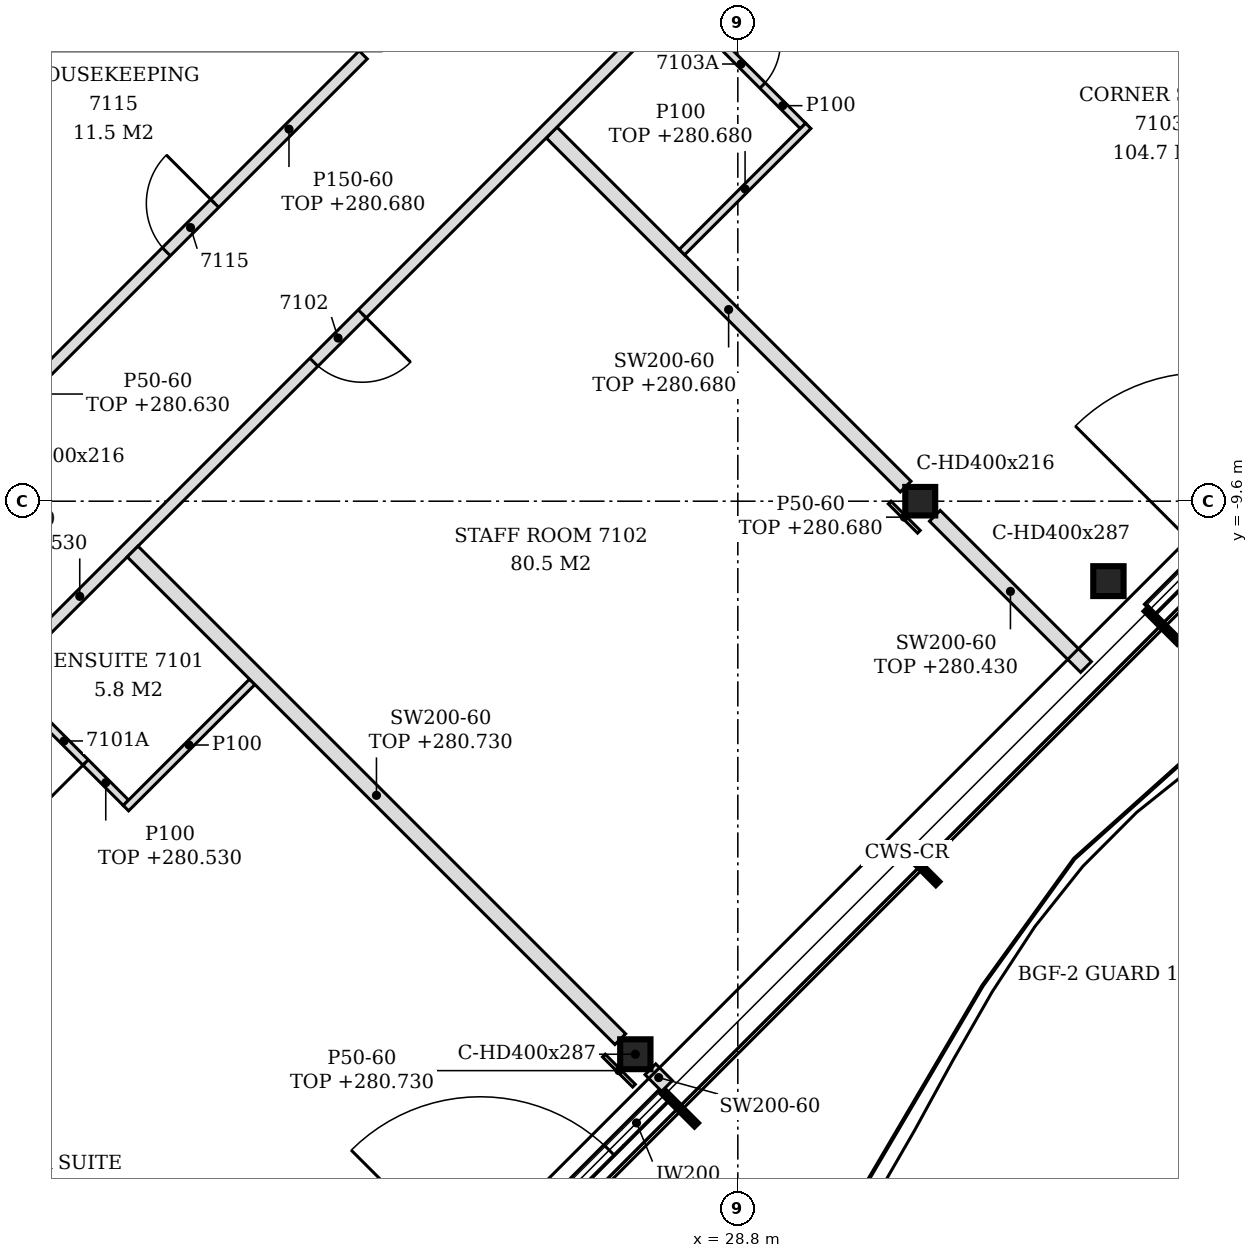
"""IFC4 building model, lengths in metres.
Left out: names, types, materials, properties, quantities, classifications, styles, units other than length and angle.
Written with IfcOpenShell. Run it as: python <this file> out.ifc"""

import sys

from ifc_helpers import new_model, si_unit, direction, frame, frame_2d, origin, origin_2d, place, context, subcontext, project, spatial, rectangle, i_section, extrude, element, fill, save


model = new_model("IFC4")
c1 = context("Model", 3, precision=1e-05, world=origin(), true_north=direction((0.0, 1.0)))
c2 = subcontext(c1, "Body", "Model", "MODEL_VIEW")
j1 = project(units=[si_unit("LENGTHUNIT", "METRE"), si_unit("PLANEANGLEUNIT", "RADIAN")], contexts=[c1])
p1 = place(None, origin())
s1 = spatial("IfcSite", under=j1, at=p1, CompositionType="ELEMENT")
p2 = place(p1, origin())
s2 = spatial("IfcBuilding", under=s1, at=p2, CompositionType="ELEMENT")
p3 = place(p2, frame((0.0, 0.0, 277.8)))
s3 = spatial("IfcBuildingStorey", under=s2, at=p3, CompositionType="ELEMENT", Elevation=277.8)
for number, where, z_axis, x_axis in (
    (1, (27.451, -16.876, -0.15), (0.0, 0.0, 1.0), (1.0, 0.0, 0.0)),
    (2, (33.676, -10.652, -0.15), (0.0, 0.0, 1.0), (1.0, 0.0, 0.0)),
):
    element("IfcColumn", number, at=place(p3, frame(where, z_axis=z_axis, x_axis=x_axis)), inside=s3, PredefinedType="COLUMN", context=c2, shape_type="SweptSolid", body=[
        extrude(i_section(OverallWidth=0.399, OverallDepth=0.393, WebThickness=0.023, FlangeThickness=0.037, FilletRadius=0.015, at=origin_2d()), origin(), (0.0, 0.0, 1.0), 3.6),
    ])
p4 = place(p3, frame((31.2, -9.6, -0.15), z_axis=(0.0, 0.0, 1.0), x_axis=(1.0, 0.0, 0.0)))
e3 = element("IfcColumn", 3, at=p4, inside=s3, PredefinedType="COLUMN", context=c2, shape_type="SweptSolid", body=[
    extrude(i_section(OverallWidth=0.394, OverallDepth=0.375, WebThickness=0.017, FlangeThickness=0.028, FilletRadius=0.015, at=origin_2d()), origin(), (0.0, 0.0, 1.0), 3.6),
])
p5 = place(p3, frame((24.693, -20.553, 0.0), z_axis=(0.0, 0.0, 1.0), x_axis=(0.707079231393, 0.707134329907, 0.0)))
e4 = element("IfcWall", 4, at=p5, inside=s3, PredefinedType="NOTDEFINED", context=c2, shape_type="SweptSolid", body=[
    extrude(rectangle(XDim=4.431, YDim=0.2, at=frame_2d((2.215, 0.0))), origin(), (0.0, 0.0, 1.0), 3.45),
])
p6 = place(p5, frame((1.015, 0.0, 0.0)))
e5 = element("IfcOpeningElement", 5, at=p6, cuts=e4, PredefinedType="OPENING", context=c2, shape_type="SweptSolid", body=[
    extrude(rectangle(XDim=2.4, YDim=2.4, at=frame_2d((1.2, 1.2))), frame((0.0, 0.11, 0.0), z_axis=(0.0, -1.0, 0.0), x_axis=(1.0, 0.0, 0.0)), (0.0, 0.0, 1.0), 0.22),
])
p7 = place(p3, frame((34.22, -11.026, 0.0), z_axis=(0.0, 0.0, 1.0), x_axis=(0.707134329907, 0.707079231393, 0.0)))
e6 = element("IfcWall", 6, at=p7, inside=s3, PredefinedType="NOTDEFINED", context=c2, shape_type="SweptSolid", body=[
    extrude(rectangle(XDim=4.431, YDim=0.2, at=frame_2d((2.215, 0.0))), origin(), (0.0, 0.0, 1.0), 3.45),
])
p8 = place(p7, frame((1.015, 0.0, 0.0)))
e7 = element("IfcOpeningElement", 7, at=p8, cuts=e6, PredefinedType="OPENING", context=c2, shape_type="SweptSolid", body=[
    extrude(rectangle(XDim=2.4, YDim=2.4, at=frame_2d((1.2, 1.2))), frame((0.0, 0.11, 0.0), z_axis=(0.0, -1.0, 0.0), x_axis=(1.0, 0.0, 0.0)), (0.0, 0.0, 1.0), 0.22),
])
p9 = place(p3, frame((13.122, -17.872, 0.0), z_axis=(0.0, 0.0, 1.0), x_axis=(0.707101927234, 0.707111635106, 0.0)))
e8 = element("IfcWall", 8, at=p9, inside=s3, PredefinedType="PARTITIONING", context=c2, shape_type="SweptSolid", body=[
    extrude(rectangle(XDim=25.149, YDim=0.15, at=frame_2d((12.574, 0.0))), origin(), (0.0, 0.0, 1.0), 2.73),
])
p10 = place(p9, frame((4.672, 0.0, 0.0)))
e9 = element("IfcOpeningElement", 9, at=p10, cuts=e8, PredefinedType="OPENING", context=c2, shape_type="SweptSolid", body=[
    extrude(rectangle(XDim=0.9, YDim=2.1, at=frame_2d((0.45, 1.05))), frame((0.0, 0.085, 0.0), z_axis=(0.0, -1.0, 0.0), x_axis=(1.0, 0.0, 0.0)), (0.0, 0.0, 1.0), 0.17),
])
p11 = place(p9, frame((14.284, 0.0, 0.0)))
e10 = element("IfcOpeningElement", 10, at=p11, cuts=e8, PredefinedType="OPENING", context=c2, shape_type="SweptSolid", body=[
    extrude(rectangle(XDim=0.9, YDim=2.1, at=frame_2d((0.45, 1.05))), frame((0.0, 0.085, 0.0), z_axis=(0.0, -1.0, 0.0), x_axis=(1.0, 0.0, 0.0)), (0.0, 0.0, 1.0), 0.17),
])
p12 = place(p9, frame((22.704, 0.0, 0.0)))
e11 = element("IfcOpeningElement", 11, at=p12, cuts=e8, PredefinedType="OPENING", context=c2, shape_type="SweptSolid", body=[
    extrude(rectangle(XDim=0.9, YDim=2.1, at=frame_2d((0.45, 1.05))), frame((0.0, 0.085, 0.0), z_axis=(0.0, -1.0, 0.0), x_axis=(1.0, 0.0, 0.0)), (0.0, 0.0, 1.0), 0.17),
])
p13 = place(p3, frame((27.869, -17.293, 0.0), z_axis=(0.0, 0.0, 1.0), x_axis=(-0.707106781187, 0.707106781187, 0.0)))
e12 = element("IfcWall", 12, at=p13, inside=s3, PredefinedType="PARTITIONING", context=c2, shape_type="SweptSolid", body=[
    extrude(rectangle(XDim=0.31, YDim=0.2, at=frame_2d((0.155, 0.0))), origin(), (0.0, 0.0, 1.0), 3.45),
])
p14 = place(p3, frame((27.254, -16.677, 0.0), z_axis=(0.0, 0.0, 1.0), x_axis=(-0.707120235152, 0.707093326965, 0.0)))
e13 = element("IfcWall", 13, at=p14, inside=s3, PredefinedType="PARTITIONING", context=c2, shape_type="SweptSolid", body=[
    extrude(rectangle(XDim=9.073, YDim=0.2, at=frame_2d((4.537, 0.0))), origin(), (0.0, 0.0, 1.0), 2.93),
])
p15 = place(p3, frame((20.75, -13.568, 0.0), z_axis=(0.0, 0.0, 1.0), x_axis=(-0.707053116953, 0.707160441348, 0.0)))
e14 = element("IfcWall", 14, at=p15, inside=s3, PredefinedType="PARTITIONING", context=c2, shape_type="SweptSolid", body=[
    extrude(rectangle(XDim=2.275, YDim=0.1, at=frame_2d((1.137, 0.0))), origin(), (0.0, 0.0, 1.0), 2.73),
])
p16 = place(p15, frame((0.75, 0.0, 0.0)))
e15 = element("IfcOpeningElement", 15, at=p16, cuts=e14, PredefinedType="OPENING", context=c2, shape_type="SweptSolid", body=[
    extrude(rectangle(XDim=0.8, YDim=2.1, at=frame_2d((0.4, 1.05))), frame((0.0, 0.06, 0.0), z_axis=(0.0, -1.0, 0.0), x_axis=(1.0, 0.0, 0.0)), (0.0, 0.0, 1.0), 0.12),
])
p17 = place(p3, frame((20.75, -13.638, 0.0), z_axis=(0.0, 0.0, 1.0), x_axis=(0.707158722772, 0.707054835785, 0.0)))
e16 = element("IfcWall", 16, at=p17, inside=s3, PredefinedType="PARTITIONING", context=c2, shape_type="SweptSolid", body=[
    extrude(rectangle(XDim=2.35, YDim=0.1, at=frame_2d((1.175, 0.0))), origin(), (0.0, 0.0, 1.0), 3.45),
])
p18 = place(p3, frame((33.381, -11.781, 0.0), z_axis=(0.0, 0.0, 1.0), x_axis=(-0.707106781187, 0.707106781187, 0.0)))
e17 = element("IfcWall", 17, at=p18, inside=s3, PredefinedType="PARTITIONING", context=c2, shape_type="SweptSolid", body=[
    extrude(rectangle(XDim=2.812, YDim=0.2, at=frame_2d((1.406, 0.0))), origin(), (0.0, 0.0, 1.0), 2.63),
])
p19 = place(p3, frame((31.008, -9.408, 0.0), z_axis=(0.0, 0.0, 1.0), x_axis=(-0.707106781187, 0.707106781187, 0.0)))
e18 = element("IfcWall", 18, at=p19, inside=s3, PredefinedType="PARTITIONING", context=c2, shape_type="SweptSolid", body=[
    extrude(rectangle(XDim=6.587, YDim=0.2, at=frame_2d((3.293, 0.0))), origin(), (0.0, 0.0, 1.0), 2.88),
])
p20 = place(p3, frame((19.392, -8.208, 0.0), z_axis=(0.0, 0.0, 1.0), x_axis=(0.707087512134, 0.707126049714, 0.0)))
e19 = element("IfcWall", 19, at=p20, inside=s3, PredefinedType="PARTITIONING", context=c2, shape_type="SweptSolid", body=[
    extrude(rectangle(XDim=6.335, YDim=0.15, at=frame_2d((3.167, 0.0))), origin(), (0.0, 0.0, 1.0), 2.88),
])
p21 = place(p20, frame((2.672, 0.0, 0.0)))
e20 = element("IfcOpeningElement", 20, at=p21, cuts=e19, PredefinedType="OPENING", context=c2, shape_type="SweptSolid", body=[
    extrude(rectangle(XDim=0.9, YDim=2.1, at=frame_2d((0.45, 1.05))), frame((0.0, 0.085, 0.0), z_axis=(0.0, -1.0, 0.0), x_axis=(1.0, 0.0, 0.0)), (0.0, 0.0, 1.0), 0.17),
])
p22 = place(p3, frame((28.065, -6.323, 0.0), z_axis=(0.0, 0.0, 1.0), x_axis=(0.707106781187, 0.707106781187, 0.0)))
e21 = element("IfcWall", 21, at=p22, inside=s3, PredefinedType="PARTITIONING", context=c2, shape_type="SweptSolid", body=[
    extrude(rectangle(XDim=2.35, YDim=0.1, at=frame_2d((1.175, 0.0))), origin(), (0.0, 0.0, 1.0), 2.88),
])
p23 = place(p3, frame((29.656, -4.662, 0.0), z_axis=(0.0, 0.0, 1.0), x_axis=(-0.707053116953, 0.707160441348, 0.0)))
e22 = element("IfcWall", 22, at=p23, inside=s3, PredefinedType="PARTITIONING", context=c2, shape_type="SweptSolid", body=[
    extrude(rectangle(XDim=2.275, YDim=0.1, at=frame_2d((1.137, 0.0))), origin(), (0.0, 0.0, 1.0), 3.45),
])
p24 = place(p23, frame((0.75, 0.0, 0.0)))
e23 = element("IfcOpeningElement", 23, at=p24, cuts=e22, PredefinedType="OPENING", context=c2, shape_type="SweptSolid", body=[
    extrude(rectangle(XDim=0.8, YDim=2.1, at=frame_2d((0.4, 1.05))), frame((0.0, 0.06, 0.0), z_axis=(0.0, -1.0, 0.0), x_axis=(1.0, 0.0, 0.0)), (0.0, 0.0, 1.0), 0.12),
])
p25 = place(p3, frame((27.434, -17.289, 0.0), z_axis=(0.0, 0.0, 1.0), x_axis=(-0.707106781187, 0.707106781187, 0.0)))
e24 = element("IfcWall", 24, at=p25, inside=s3, PredefinedType="PARTITIONING", context=c2, shape_type="SweptSolid", body=[
    extrude(rectangle(XDim=0.56, YDim=0.05, at=frame_2d((0.28, 0.0))), origin(), (0.0, 0.0, 1.0), 2.93),
])
p26 = place(p3, frame((31.182, -10.002, 0.0), z_axis=(0.0, 0.0, 1.0), x_axis=(-0.707106781187, 0.707106781187, 0.0)))
e25 = element("IfcWall", 25, at=p26, inside=s3, PredefinedType="PARTITIONING", context=c2, shape_type="SweptSolid", body=[
    extrude(rectangle(XDim=0.544, YDim=0.05, at=frame_2d((0.272, 0.0))), origin(), (0.0, 0.0, 1.0), 2.88),
])
p27 = place(p6, origin())
e26 = element("IfcDoor", 26, at=p27, inside=s3, OperationType="SINGLE_SWING_LEFT", PredefinedType="DOOR", context=c2, shape_type="SweptSolid", body=[
    extrude(rectangle(XDim=2.4, YDim=2.4, at=frame_2d((1.2, 1.2))), frame((0.0, 0.025, 0.0), z_axis=(0.0, -1.0, 0.0), x_axis=(1.0, 0.0, 0.0)), (0.0, 0.0, 1.0), 0.05),
])
fill(e5, e26)
p28 = place(p16, origin())
e27 = element("IfcDoor", 27, at=p28, inside=s3, OperationType="SINGLE_SWING_LEFT", PredefinedType="DOOR", context=c2, shape_type="SweptSolid", body=[
    extrude(rectangle(XDim=0.8, YDim=2.1, at=frame_2d((0.4, 1.05))), frame((0.0, 0.025, 0.0), z_axis=(0.0, -1.0, 0.0), x_axis=(1.0, 0.0, 0.0)), (0.0, 0.0, 1.0), 0.05),
])
fill(e15, e27)
p29 = place(p11, frame((0.9, 0.0, 0.0), z_axis=(0.0, 0.0, 1.0), x_axis=(-1.0, 0.0, 0.0)))
e28 = element("IfcDoor", 28, at=p29, inside=s3, OperationType="SINGLE_SWING_LEFT", PredefinedType="DOOR", context=c2, shape_type="SweptSolid", body=[
    extrude(rectangle(XDim=0.9, YDim=2.1, at=frame_2d((0.45, 1.05))), frame((0.0, 0.025, 0.0), z_axis=(0.0, -1.0, 0.0), x_axis=(1.0, 0.0, 0.0)), (0.0, 0.0, 1.0), 0.05),
])
fill(e10, e28)
p30 = place(p24, frame((0.8, 0.0, 0.0), z_axis=(0.0, 0.0, 1.0), x_axis=(-1.0, 0.0, 0.0)))
e29 = element("IfcDoor", 29, at=p30, inside=s3, OperationType="SINGLE_SWING_LEFT", PredefinedType="DOOR", context=c2, shape_type="SweptSolid", body=[
    extrude(rectangle(XDim=0.8, YDim=2.1, at=frame_2d((0.4, 1.05))), frame((0.0, 0.025, 0.0), z_axis=(0.0, -1.0, 0.0), x_axis=(1.0, 0.0, 0.0)), (0.0, 0.0, 1.0), 0.05),
])
fill(e23, e29)
p31 = place(p21, origin())
e30 = element("IfcDoor", 30, at=p31, inside=s3, OperationType="SINGLE_SWING_RIGHT", PredefinedType="DOOR", context=c2, shape_type="SweptSolid", body=[
    extrude(rectangle(XDim=0.9, YDim=2.1, at=frame_2d((0.45, 1.05))), frame((0.0, 0.025, 0.0), z_axis=(0.0, -1.0, 0.0), x_axis=(1.0, 0.0, 0.0)), (0.0, 0.0, 1.0), 0.05),
])
fill(e20, e30)
save(model, sys.argv[1])
